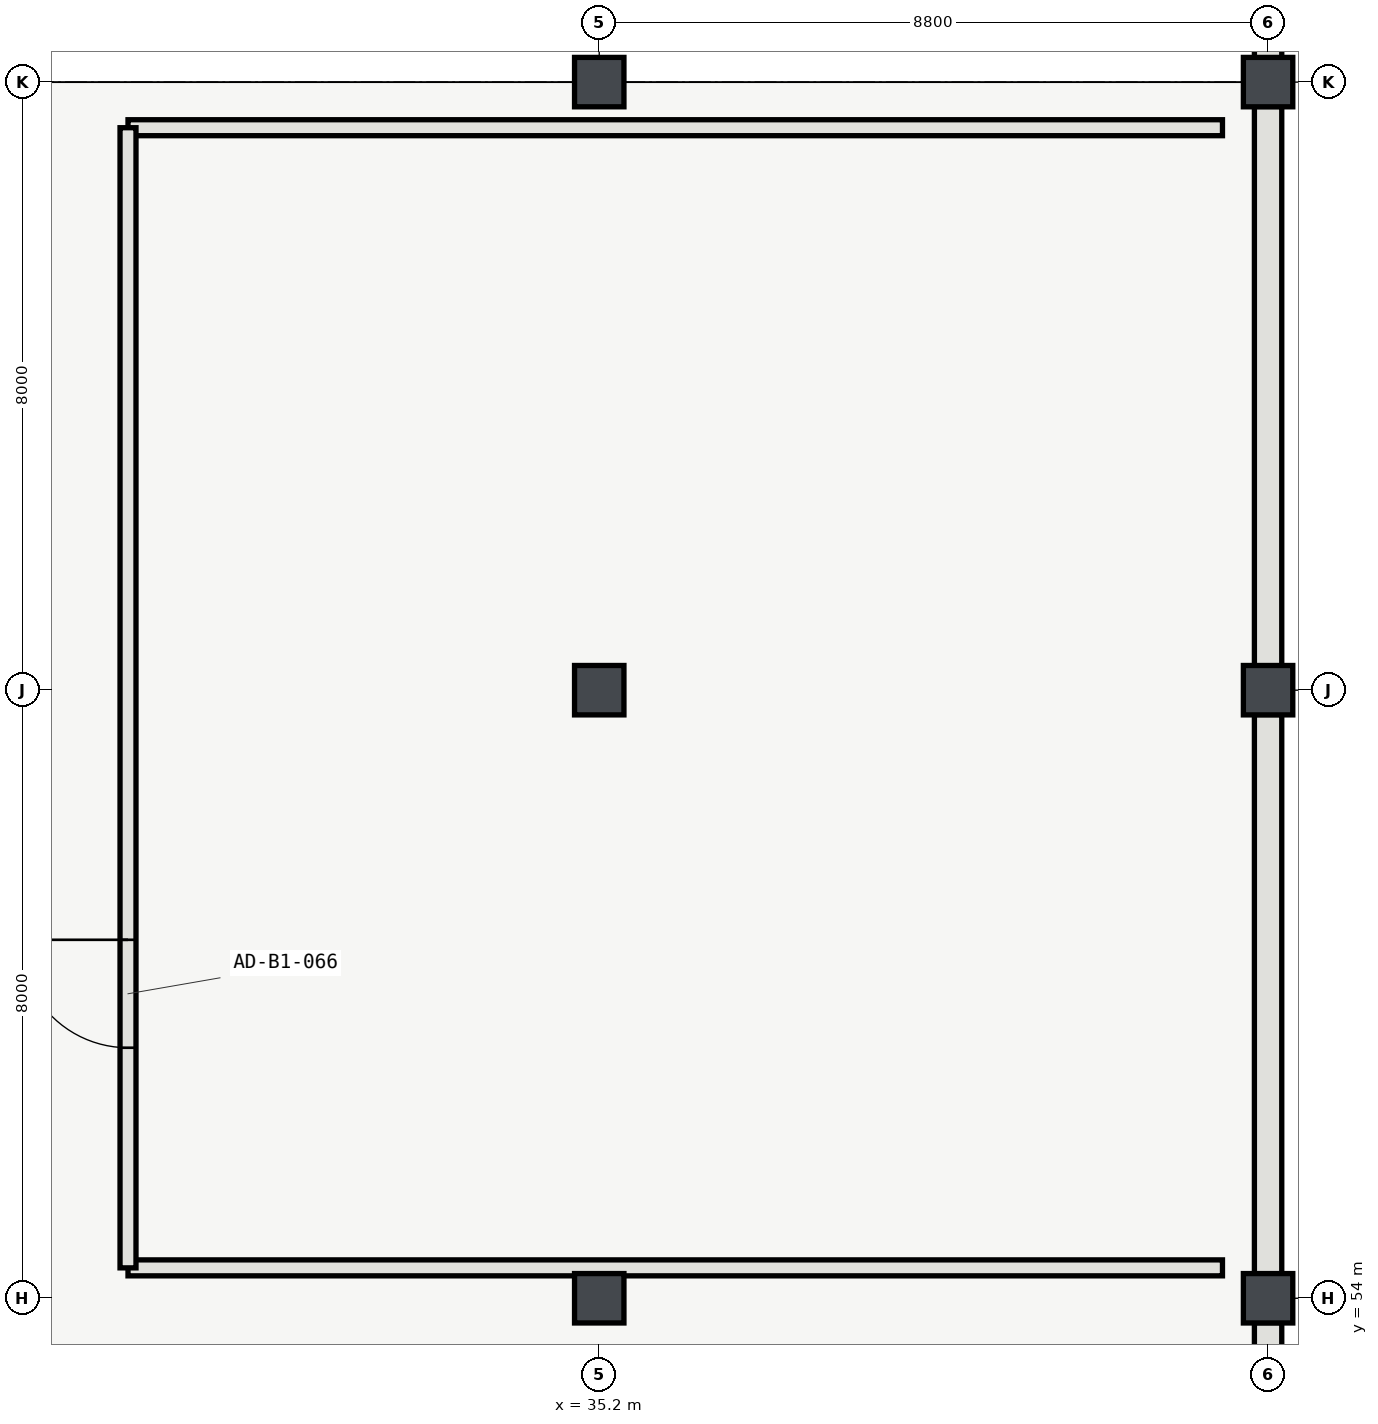
"""IFC4 building model, lengths in metres.
Left out: names, types, materials, properties, quantities, classifications, styles, units other than length and angle.
Written with IfcOpenShell. Run it as: python <this file> out.ifc"""

import sys

from ifc_helpers import new_model, si_unit, direction, frame, frame_2d, origin, origin_2d, place, context, subcontext, project, spatial, rectangle, hollow_rectangle, extrude, element, fill, save


model = new_model("IFC4")
c1 = context("Model", 3, precision=1e-05, world=origin(), true_north=direction((0.0, 1.0)))
c2 = subcontext(c1, "Body", "Model", "MODEL_VIEW")
j1 = project(units=[si_unit("LENGTHUNIT", "METRE"), si_unit("PLANEANGLEUNIT", "RADIAN")], contexts=[c1])
p1 = place(None, origin())
s1 = spatial("IfcSite", under=j1, at=p1, CompositionType="ELEMENT")
p2 = place(p1, origin())
s2 = spatial("IfcBuilding", under=s1, at=p2, CompositionType="ELEMENT")
p3 = place(p2, frame((0.0, 0.0, -4.8)))
s3 = spatial("IfcBuildingStorey", under=s2, at=p3, CompositionType="ELEMENT", Elevation=-4.8)
for number, where, z_axis, x_axis in (
    (1, (35.2, 54.0, 0.0), (0.0, 0.0, 1.0), (1.0, 0.0, 0.0)),
    (2, (35.2, 62.0, 0.0), (0.0, 0.0, 1.0), (1.0, 0.0, 0.0)),
    (3, (35.2, 70.0, 0.0), (0.0, 0.0, 1.0), (1.0, 0.0, 0.0)),
    (4, (44.0, 54.0, 0.0), (0.0, 0.0, 1.0), (1.0, 0.0, 0.0)),
    (5, (44.0, 62.0, 0.0), (0.0, 0.0, 1.0), (1.0, 0.0, 0.0)),
    (6, (44.0, 70.0, 0.0), (0.0, 0.0, 1.0), (1.0, 0.0, 0.0)),
):
    element("IfcColumn", number, at=place(p3, frame(where, z_axis=z_axis, x_axis=x_axis)), inside=s3, PredefinedType="COLUMN", context=c2, shape_type="SweptSolid", body=[
        extrude(hollow_rectangle(XDim=0.65, YDim=0.65, WallThickness=0.026, InnerFilletRadius=0.026, OuterFilletRadius=0.052, at=origin_2d()), origin(), (0.0, 0.0, 1.0), 4.8),
    ])
for number, where, z_axis, x_axis in (
    (7, (44.0, 46.321, 0.0), (0.0, 0.0, 1.0), (0.0, 1.0, 0.0)),
    (8, (44.0, 54.321, 0.0), (0.0, 0.0, 1.0), (0.0, 1.0, 0.0)),
    (9, (44.0, 62.321, 0.0), (0.0, 0.0, 1.0), (0.0, 1.0, 0.0)),
):
    element("IfcWall", number, at=place(p3, frame(where, z_axis=z_axis, x_axis=x_axis)), inside=s3, PredefinedType="USERDEFINED", context=c2, shape_type="SweptSolid", body=[
        extrude(rectangle(XDim=7.358, YDim=0.36, at=frame_2d((3.679, 0.0))), origin(), (0.0, 0.0, 1.0), 3.883),
    ])
p4 = place(p3, frame((44.0, 70.321, 0.0), z_axis=(0.0, 0.0, 1.0), x_axis=(0.0, 1.0, 0.0)))
e10 = element("IfcWall", 10, at=p4, inside=s3, PredefinedType="USERDEFINED", context=c2, shape_type="SweptSolid", body=[
    extrude(rectangle(XDim=7.483, YDim=0.36, at=frame_2d((3.741, 0.0))), origin(), (0.0, 0.0, 1.0), 3.883),
])
for number, where, z_axis, x_axis in (
    (11, (29.0, 54.4, 0.0), (0.0, 0.0, 1.0), (1.0, 0.0, 0.0)),
    (12, (43.4, 69.4, 0.0), (0.0, 0.0, 1.0), (-1.0, 0.0, 0.0)),
):
    element("IfcWall", number, at=place(p3, frame(where, z_axis=z_axis, x_axis=x_axis)), inside=s3, PredefinedType="PARTITIONING", context=c2, shape_type="SweptSolid", body=[
        extrude(rectangle(XDim=14.4, YDim=0.21, at=frame_2d((7.2, 0.0))), origin(), (0.0, 0.0, 1.0), 4.52),
    ])
p5 = place(p3, frame((29.0, 69.4, 0.0), z_axis=(0.0, 0.0, 1.0), x_axis=(0.0, -1.0, 0.0)))
e13 = element("IfcWall", 13, at=p5, inside=s3, PredefinedType="PARTITIONING", context=c2, shape_type="SweptSolid", body=[
    extrude(rectangle(XDim=15.0, YDim=0.21, at=frame_2d((7.5, 0.0))), origin(), (0.0, 0.0, 1.0), 4.52),
])
p6 = place(p5, frame((10.684, 0.0, 0.0)))
e14 = element("IfcOpeningElement", 14, at=p6, cuts=e13, PredefinedType="OPENING", context=c2, shape_type="SweptSolid", body=[
    extrude(rectangle(XDim=1.42, YDim=2.25, at=frame_2d((0.71, 1.125))), frame((0.0, 0.115, 0.0), z_axis=(0.0, -1.0, 0.0), x_axis=(1.0, 0.0, 0.0)), (0.0, 0.0, 1.0), 0.23),
])
p7 = place(p6, origin())
e15 = element("IfcDoor", 15, at=p7, inside=s3, OperationType="DOUBLE_DOOR_SINGLE_SWING", PredefinedType="DOOR", context=c2, shape_type="SweptSolid", body=[
    extrude(rectangle(XDim=1.42, YDim=2.25, at=frame_2d((0.71, 1.125))), frame((0.0, 0.025, 0.0), z_axis=(0.0, -1.0, 0.0), x_axis=(1.0, 0.0, 0.0)), (0.0, 0.0, 1.0), 0.05),
])
fill(e14, e15)
save(model, sys.argv[1])
